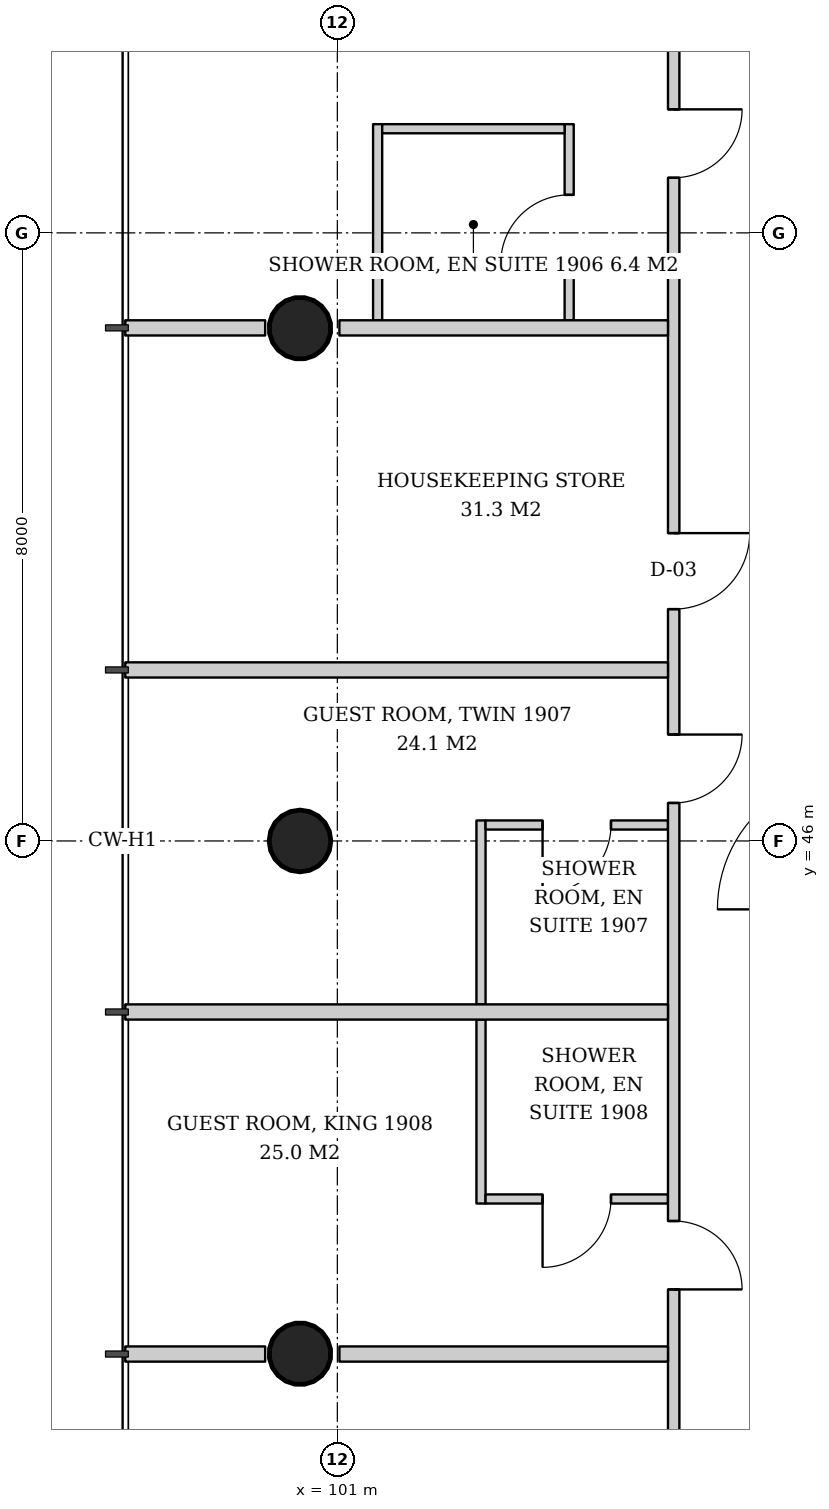
"""IFC4 building model, lengths in metres.
Left out: names, types, materials, properties, quantities, classifications, styles, units other than length and angle.
Written with IfcOpenShell. Run it as: python <this file> out.ifc"""

import sys

from ifc_helpers import new_model, si_unit, direction, frame, frame_2d, origin, origin_2d, place, context, subcontext, project, spatial, rectangle, hollow_circle, extrude, element, fill, save


model = new_model("IFC4")
c1 = context("Model", 3, precision=1e-05, world=origin(), true_north=direction((0.0, 1.0)))
c2 = subcontext(c1, "Body", "Model", "MODEL_VIEW")
j1 = project(units=[si_unit("LENGTHUNIT", "METRE"), si_unit("PLANEANGLEUNIT", "RADIAN")], contexts=[c1])
p1 = place(None, origin())
s1 = spatial("IfcSite", under=j1, at=p1, CompositionType="ELEMENT")
p2 = place(p1, origin())
s2 = spatial("IfcBuilding", under=s1, at=p2, CompositionType="ELEMENT")
p3 = place(p2, frame((0.0, 0.0, 78.0)))
s3 = spatial("IfcBuildingStorey", under=s2, at=p3, CompositionType="ELEMENT", Elevation=78.0)
p4 = place(p3, frame((100.457, 52.771, 0.0), z_axis=(0.043059584825, -0.021497706284, 0.998841188968), x_axis=(0.446680166538, 0.894693706707, 0.0)))
e1 = element("IfcColumn", 1, at=p4, inside=s3, PredefinedType="COLUMN", context=c2, shape_type="SweptSolid", body=[
    extrude(hollow_circle(Radius=0.406, WallThickness=0.03, at=origin_2d()), origin(), (0.0, 0.0, 1.0), 3.804),
])
p5 = place(p3, frame((100.457, 46.0, 0.0), z_axis=(0.043069538298, 0.0, 0.999072076915), x_axis=(0.0, 1.0, 0.0)))
e2 = element("IfcColumn", 2, at=p5, inside=s3, PredefinedType="COLUMN", context=c2, shape_type="SweptSolid", body=[
    extrude(hollow_circle(Radius=0.406, WallThickness=0.03, at=origin_2d()), origin(), (0.0, 0.0, 1.0), 3.803),
])
p6 = place(p3, frame((100.457, 39.229, 0.0), z_axis=(0.043059584825, 0.021497706284, 0.998841188968), x_axis=(-0.446680166538, 0.894693706707, 0.0)))
e3 = element("IfcColumn", 3, at=p6, inside=s3, PredefinedType="COLUMN", context=c2, shape_type="SweptSolid", body=[
    extrude(hollow_circle(Radius=0.406, WallThickness=0.03, at=origin_2d()), origin(), (0.0, 0.0, 1.0), 3.804),
])
p7 = place(p3, frame((104.05, 52.85, 0.0), z_axis=(0.0, 0.0, 1.0), x_axis=(0.0, 1.0, 0.0)))
e4 = element("IfcWall", 4, at=p7, inside=s3, PredefinedType="PARTITIONING", context=c2, shape_type="SweptSolid", body=[
    extrude(rectangle(XDim=2.58, YDim=0.12, at=frame_2d((1.29, 0.0))), origin(), (0.0, 0.0, 1.0), 2.82),
])
p8 = place(p7, frame((0.75, 0.0, 0.0)))
e5 = element("IfcOpeningElement", 5, at=p8, cuts=e4, PredefinedType="OPENING", context=c2, shape_type="SweptSolid", body=[
    extrude(rectangle(XDim=0.9, YDim=2.1, at=frame_2d((0.45, 1.05))), frame((0.0, 0.07, 0.0), z_axis=(0.0, -1.0, 0.0), x_axis=(1.0, 0.0, 0.0)), (0.0, 0.0, 1.0), 0.14),
])
p9 = place(p3, frame((101.53, 52.85, 0.0), z_axis=(0.0, 0.0, 1.0), x_axis=(0.0, 1.0, 0.0)))
e6 = element("IfcWall", 6, at=p9, inside=s3, PredefinedType="PARTITIONING", context=c2, shape_type="SweptSolid", body=[
    extrude(rectangle(XDim=2.58, YDim=0.12, at=frame_2d((1.29, 0.0))), origin(), (0.0, 0.0, 1.0), 2.82),
])
p10 = place(p3, frame((103.99, 55.37, 0.0), z_axis=(0.0, 0.0, 1.0), x_axis=(-1.0, 0.0, 0.0)))
e7 = element("IfcWall", 7, at=p10, inside=s3, PredefinedType="PARTITIONING", context=c2, shape_type="SweptSolid", body=[
    extrude(rectangle(XDim=2.4, YDim=0.12, at=frame_2d((1.2, 0.0))), origin(), (0.0, 0.0, 1.0), 2.82),
])
p11 = place(p3, frame((102.89, 46.27, 0.0), z_axis=(0.0, 0.0, 1.0), x_axis=(0.0, -1.0, 0.0)))
e8 = element("IfcWall", 8, at=p11, inside=s3, PredefinedType="PARTITIONING", context=c2, shape_type="SweptSolid", body=[
    extrude(rectangle(XDim=2.42, YDim=0.12, at=frame_2d((1.21, 0.0))), origin(), (0.0, 0.0, 1.0), 3.52),
])
p12 = place(p3, frame((105.35, 46.21, 0.0), z_axis=(0.0, 0.0, 1.0), x_axis=(-1.0, 0.0, 0.0)))
e9 = element("IfcWall", 9, at=p12, inside=s3, PredefinedType="PARTITIONING", context=c2, shape_type="SweptSolid", body=[
    extrude(rectangle(XDim=2.4, YDim=0.12, at=frame_2d((1.2, 0.0))), origin(), (0.0, 0.0, 1.0), 3.52),
])
p13 = place(p12, frame((0.75, 0.0, 0.0)))
e10 = element("IfcOpeningElement", 10, at=p13, cuts=e9, PredefinedType="OPENING", context=c2, shape_type="SweptSolid", body=[
    extrude(rectangle(XDim=0.9, YDim=2.1, at=frame_2d((0.45, 1.05))), frame((0.0, 0.07, 0.0), z_axis=(0.0, -1.0, 0.0), x_axis=(1.0, 0.0, 0.0)), (0.0, 0.0, 1.0), 0.14),
])
p14 = place(p3, frame((102.89, 43.65, 0.0), z_axis=(0.0, 0.0, 1.0), x_axis=(0.0, -1.0, 0.0)))
e11 = element("IfcWall", 11, at=p14, inside=s3, PredefinedType="PARTITIONING", context=c2, shape_type="SweptSolid", body=[
    extrude(rectangle(XDim=2.42, YDim=0.12, at=frame_2d((1.21, 0.0))), origin(), (0.0, 0.0, 1.0), 2.72),
])
p15 = place(p3, frame((105.35, 41.29, 0.0), z_axis=(0.0, 0.0, 1.0), x_axis=(-1.0, 0.0, 0.0)))
e12 = element("IfcWall", 12, at=p15, inside=s3, PredefinedType="PARTITIONING", context=c2, shape_type="SweptSolid", body=[
    extrude(rectangle(XDim=2.4, YDim=0.12, at=frame_2d((1.2, 0.0))), origin(), (0.0, 0.0, 1.0), 3.52),
])
p16 = place(p15, frame((0.75, 0.0, 0.0)))
e13 = element("IfcOpeningElement", 13, at=p16, cuts=e12, PredefinedType="OPENING", context=c2, shape_type="SweptSolid", body=[
    extrude(rectangle(XDim=0.9, YDim=2.1, at=frame_2d((0.45, 1.05))), frame((0.0, 0.07, 0.0), z_axis=(0.0, -1.0, 0.0), x_axis=(1.0, 0.0, 0.0)), (0.0, 0.0, 1.0), 0.14),
])
p17 = place(p3, frame((105.425, 57.65, 0.0), z_axis=(0.0, 0.0, 1.0), x_axis=(0.0, -1.0, 0.0)))
e14 = element("IfcWall", 14, at=p17, inside=s3, PredefinedType="PARTITIONING", context=c2, shape_type="SweptSolid", body=[
    extrude(rectangle(XDim=23.15, YDim=0.15, at=frame_2d((11.575, 0.0))), origin(), (0.0, 0.0, 1.0), 2.72),
])
p18 = place(p17, frame((2.025, 0.0, 0.0)))
e15 = element("IfcOpeningElement", 15, at=p18, cuts=e14, PredefinedType="OPENING", context=c2, shape_type="SweptSolid", body=[
    extrude(rectangle(XDim=0.9, YDim=2.1, at=frame_2d((0.45, 1.05))), frame((0.0, 0.085, 0.0), z_axis=(0.0, -1.0, 0.0), x_axis=(1.0, 0.0, 0.0)), (0.0, 0.0, 1.0), 0.17),
])
p19 = place(p17, frame((7.6, 0.0, 0.0)))
e16 = element("IfcOpeningElement", 16, at=p19, cuts=e14, PredefinedType="OPENING", context=c2, shape_type="SweptSolid", body=[
    extrude(rectangle(XDim=1.0, YDim=2.1, at=frame_2d((0.5, 1.05))), frame((0.0, 0.085, 0.0), z_axis=(0.0, -1.0, 0.0), x_axis=(1.0, 0.0, 0.0)), (0.0, 0.0, 1.0), 0.17),
])
p20 = place(p17, frame((10.25, 0.0, 0.0)))
e17 = element("IfcOpeningElement", 17, at=p20, cuts=e14, PredefinedType="OPENING", context=c2, shape_type="SweptSolid", body=[
    extrude(rectangle(XDim=0.9, YDim=2.1, at=frame_2d((0.45, 1.05))), frame((0.0, 0.085, 0.0), z_axis=(0.0, -1.0, 0.0), x_axis=(1.0, 0.0, 0.0)), (0.0, 0.0, 1.0), 0.17),
])
p21 = place(p17, frame((16.65, 0.0, 0.0)))
e18 = element("IfcOpeningElement", 18, at=p21, cuts=e14, PredefinedType="OPENING", context=c2, shape_type="SweptSolid", body=[
    extrude(rectangle(XDim=0.9, YDim=2.1, at=frame_2d((0.45, 1.05))), frame((0.0, 0.085, 0.0), z_axis=(0.0, -1.0, 0.0), x_axis=(1.0, 0.0, 0.0)), (0.0, 0.0, 1.0), 0.17),
])
p22 = place(p3, frame((105.35, 52.75, 0.0), z_axis=(0.0, 0.0, 1.0), x_axis=(-1.0, 0.0, 0.0)))
e19 = element("IfcWall", 19, at=p22, inside=s3, PredefinedType="PARTITIONING", context=c2, shape_type="SweptSolid", body=[
    extrude(rectangle(XDim=4.323, YDim=0.2, at=frame_2d((2.162, 0.0))), origin(), (0.0, 0.0, 1.0), 3.52),
])
p23 = place(p3, frame((100.05, 52.75, 0.0), z_axis=(0.0, 0.0, 1.0), x_axis=(-1.0, 0.0, 0.0)))
e20 = element("IfcWall", 20, at=p23, inside=s3, PredefinedType="PARTITIONING", context=c2, shape_type="SweptSolid", body=[
    extrude(rectangle(XDim=1.84, YDim=0.2, at=frame_2d((0.92, 0.0))), origin(), (0.0, 0.0, 1.0), 3.52),
])
for number, where, z_axis, x_axis in (
    (21, (105.35, 48.25, 0.0), (0.0, 0.0, 1.0), (-1.0, 0.0, 0.0)),
    (22, (105.35, 43.75, 0.0), (0.0, 0.0, 1.0), (-1.0, 0.0, 0.0)),
):
    element("IfcWall", number, at=place(p3, frame(where, z_axis=z_axis, x_axis=x_axis)), inside=s3, PredefinedType="PARTITIONING", context=c2, shape_type="SweptSolid", body=[
        extrude(rectangle(XDim=7.14, YDim=0.2, at=frame_2d((3.57, 0.0))), origin(), (0.0, 0.0, 1.0), 3.12),
    ])
p24 = place(p3, frame((105.35, 39.25, 0.0), z_axis=(0.0, 0.0, 1.0), x_axis=(-1.0, 0.0, 0.0)))
e23 = element("IfcWall", 23, at=p24, inside=s3, PredefinedType="PARTITIONING", context=c2, shape_type="SweptSolid", body=[
    extrude(rectangle(XDim=4.323, YDim=0.2, at=frame_2d((2.162, 0.0))), origin(), (0.0, 0.0, 1.0), 3.52),
])
p25 = place(p3, frame((100.05, 39.25, 0.0), z_axis=(0.0, 0.0, 1.0), x_axis=(-1.0, 0.0, 0.0)))
e24 = element("IfcWall", 24, at=p25, inside=s3, PredefinedType="PARTITIONING", context=c2, shape_type="SweptSolid", body=[
    extrude(rectangle(XDim=1.84, YDim=0.2, at=frame_2d((0.92, 0.0))), origin(), (0.0, 0.0, 1.0), 3.52),
])
p26 = place(p8, origin())
e25 = element("IfcDoor", 25, at=p26, inside=s3, OperationType="SINGLE_SWING_LEFT", PredefinedType="DOOR", context=c2, shape_type="SweptSolid", body=[
    extrude(rectangle(XDim=0.9, YDim=2.1, at=frame_2d((0.45, 1.05))), frame((0.0, 0.025, 0.0), z_axis=(0.0, -1.0, 0.0), x_axis=(1.0, 0.0, 0.0)), (0.0, 0.0, 1.0), 0.05),
])
fill(e5, e25)
p27 = place(p13, origin())
e26 = element("IfcDoor", 26, at=p27, inside=s3, OperationType="SINGLE_SWING_RIGHT", PredefinedType="DOOR", context=c2, shape_type="SweptSolid", body=[
    extrude(rectangle(XDim=0.9, YDim=2.1, at=frame_2d((0.45, 1.05))), frame((0.0, 0.025, 0.0), z_axis=(0.0, -1.0, 0.0), x_axis=(1.0, 0.0, 0.0)), (0.0, 0.0, 1.0), 0.05),
])
fill(e10, e26)
p28 = place(p16, origin())
e27 = element("IfcDoor", 27, at=p28, inside=s3, OperationType="SINGLE_SWING_RIGHT", PredefinedType="DOOR", context=c2, shape_type="SweptSolid", body=[
    extrude(rectangle(XDim=0.9, YDim=2.1, at=frame_2d((0.45, 1.05))), frame((0.0, 0.025, 0.0), z_axis=(0.0, -1.0, 0.0), x_axis=(1.0, 0.0, 0.0)), (0.0, 0.0, 1.0), 0.05),
])
fill(e13, e27)
p29 = place(p18, origin())
e28 = element("IfcDoor", 28, at=p29, inside=s3, OperationType="SINGLE_SWING_LEFT", PredefinedType="DOOR", context=c2, shape_type="SweptSolid", body=[
    extrude(rectangle(XDim=0.9, YDim=2.1, at=frame_2d((0.45, 1.05))), frame((0.0, 0.025, 0.0), z_axis=(0.0, -1.0, 0.0), x_axis=(1.0, 0.0, 0.0)), (0.0, 0.0, 1.0), 0.05),
])
fill(e15, e28)
p30 = place(p19, origin())
e29 = element("IfcDoor", 29, at=p30, inside=s3, OperationType="SINGLE_SWING_LEFT", PredefinedType="DOOR", context=c2, shape_type="SweptSolid", body=[
    extrude(rectangle(XDim=1.0, YDim=2.1, at=frame_2d((0.5, 1.05))), frame((0.0, 0.025, 0.0), z_axis=(0.0, -1.0, 0.0), x_axis=(1.0, 0.0, 0.0)), (0.0, 0.0, 1.0), 0.05),
])
fill(e16, e29)
p31 = place(p20, origin())
e30 = element("IfcDoor", 30, at=p31, inside=s3, OperationType="SINGLE_SWING_LEFT", PredefinedType="DOOR", context=c2, shape_type="SweptSolid", body=[
    extrude(rectangle(XDim=0.9, YDim=2.1, at=frame_2d((0.45, 1.05))), frame((0.0, 0.025, 0.0), z_axis=(0.0, -1.0, 0.0), x_axis=(1.0, 0.0, 0.0)), (0.0, 0.0, 1.0), 0.05),
])
fill(e17, e30)
p32 = place(p21, origin())
e31 = element("IfcDoor", 31, at=p32, inside=s3, OperationType="SINGLE_SWING_RIGHT", PredefinedType="DOOR", context=c2, shape_type="SweptSolid", body=[
    extrude(rectangle(XDim=0.9, YDim=2.1, at=frame_2d((0.45, 1.05))), frame((0.0, 0.025, 0.0), z_axis=(0.0, -1.0, 0.0), x_axis=(1.0, 0.0, 0.0)), (0.0, 0.0, 1.0), 0.05),
])
fill(e18, e31)
save(model, sys.argv[1])
